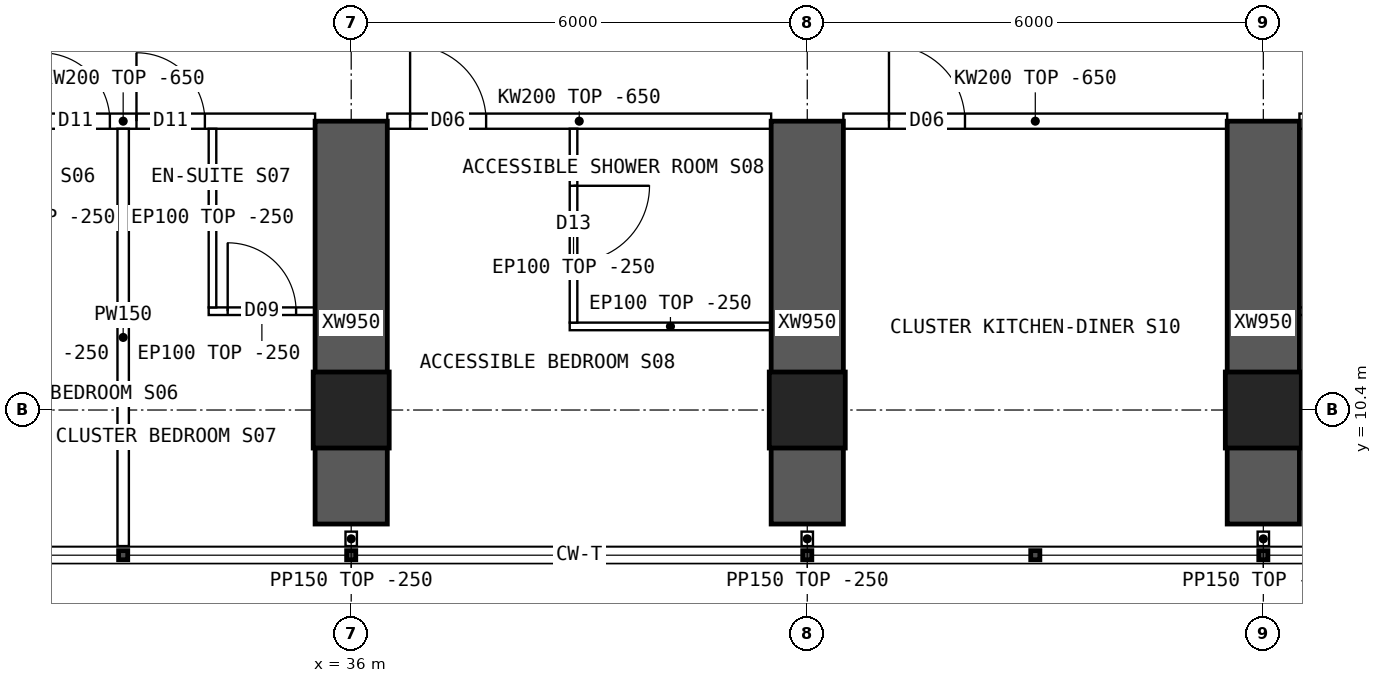
"""IFC4 building model, lengths in metres.
Left out: names, types, materials, properties, quantities, classifications, styles, units other than length and angle.
Written with IfcOpenShell. Run it as: python <this file> out.ifc"""

import sys

from ifc_helpers import new_model, si_unit, direction, frame, frame_2d, origin, origin_2d, place, context, subcontext, project, spatial, polyline, rectangle, hollow_rectangle, outline, extrude, element, fill, save


model = new_model("IFC4")
c1 = context("Model", 3, precision=1e-05, world=origin(), true_north=direction((0.0, 1.0)))
c2 = subcontext(c1, "Body", "Model", "MODEL_VIEW")
j1 = project(units=[si_unit("LENGTHUNIT", "METRE"), si_unit("PLANEANGLEUNIT", "RADIAN")], contexts=[c1])
p1 = place(None, origin())
s1 = spatial("IfcSite", under=j1, at=p1, CompositionType="ELEMENT")
p2 = place(p1, origin())
s2 = spatial("IfcBuilding", under=s1, at=p2, CompositionType="ELEMENT")
p3 = place(p2, frame((0.0, 0.0, 88.15)))
s3 = spatial("IfcBuildingStorey", under=s2, at=p3, CompositionType="ELEMENT", Elevation=88.15)
for number, where, z_axis, x_axis in (
    (1, (36.0, 10.4, 0.0), (0.0, 0.0, 1.0), (1.0, 0.0, 0.0)),
    (2, (42.0, 10.4, 0.0), (0.0, 0.0, 1.0), (1.0, 0.0, 0.0)),
    (3, (48.0, 10.4, 0.0), (0.0, 0.0, 1.0), (1.0, 0.0, 0.0)),
):
    element("IfcColumn", number, at=place(p3, frame(where, z_axis=z_axis, x_axis=x_axis)), inside=s3, PredefinedType="COLUMN", context=c2, shape_type="SweptSolid", body=[
        extrude(hollow_rectangle(XDim=1.0, YDim=1.0, WallThickness=0.1, at=origin_2d()), origin(), (0.0, 0.0, 1.0), 3.75),
    ])
for number, where, z_axis, x_axis in (
    (4, (36.0, 8.9, 0.0), (0.0, 0.0, 1.0), (0.0, 1.0, 0.0)),
    (5, (42.0, 8.9, 0.0), (0.0, 0.0, 1.0), (0.0, 1.0, 0.0)),
    (6, (48.0, 8.9, 0.0), (0.0, 0.0, 1.0), (0.0, 1.0, 0.0)),
):
    element("IfcWall", number, at=place(p3, frame(where, z_axis=z_axis, x_axis=x_axis)), inside=s3, PredefinedType="SHEAR", context=c2, shape_type="SweptSolid", body=[
        extrude(rectangle(XDim=5.3, YDim=0.95, at=frame_2d((2.65, 0.0))), origin(), (0.0, 0.0, 1.0), 3.75),
    ])
p4 = place(p3, frame((30.475, 14.2, 0.0), z_axis=(0.0, 0.0, 1.0), x_axis=(1.0, 0.0, 0.0)))
e7 = element("IfcWall", 7, at=p4, inside=s3, PredefinedType="SOLIDWALL", context=c2, shape_type="SweptSolid", body=[
    extrude(outline(polyline([(0.0, 0.0), (5.05, 0.0), (5.05, 3.1), (0.0, 3.1), (0.0, 0.0)])), frame((0.0, 0.1, 0.0), z_axis=(0.0, -1.0, 0.0), x_axis=(1.0, 0.0, 0.0)), (0.0, 0.0, 1.0), 0.2),
])
p5 = place(p4, frame((1.45, 0.0, 0.0)))
e8 = element("IfcOpeningElement", 8, at=p5, cuts=e7, PredefinedType="OPENING", context=c2, shape_type="SweptSolid", body=[
    extrude(rectangle(XDim=0.9, YDim=2.1, at=frame_2d((0.45, 1.05))), frame((0.0, 0.11, 0.0), z_axis=(0.0, -1.0, 0.0), x_axis=(1.0, 0.0, 0.0)), (0.0, 0.0, 1.0), 0.22),
])
p6 = place(p4, frame((2.7, 0.0, 0.0)))
e9 = element("IfcOpeningElement", 9, at=p6, cuts=e7, PredefinedType="OPENING", context=c2, shape_type="SweptSolid", body=[
    extrude(rectangle(XDim=0.9, YDim=2.1, at=frame_2d((0.45, 1.05))), frame((0.0, 0.11, 0.0), z_axis=(0.0, -1.0, 0.0), x_axis=(1.0, 0.0, 0.0)), (0.0, 0.0, 1.0), 0.22),
])
p7 = place(p3, frame((36.475, 14.2, 0.0), z_axis=(0.0, 0.0, 1.0), x_axis=(1.0, 0.0, 0.0)))
e10 = element("IfcWall", 10, at=p7, inside=s3, PredefinedType="SOLIDWALL", context=c2, shape_type="SweptSolid", body=[
    extrude(outline(polyline([(0.0, 0.0), (5.05, 0.0), (5.05, 3.1), (0.0, 3.1), (0.0, 0.0)])), frame((0.0, 0.1, 0.0), z_axis=(0.0, -1.0, 0.0), x_axis=(1.0, 0.0, 0.0)), (0.0, 0.0, 1.0), 0.2),
])
p8 = place(p7, frame((0.3, 0.0, 0.0)))
e11 = element("IfcOpeningElement", 11, at=p8, cuts=e10, PredefinedType="OPENING", context=c2, shape_type="SweptSolid", body=[
    extrude(rectangle(XDim=1.0, YDim=2.1, at=frame_2d((0.5, 1.05))), frame((0.0, 0.11, 0.0), z_axis=(0.0, -1.0, 0.0), x_axis=(1.0, 0.0, 0.0)), (0.0, 0.0, 1.0), 0.22),
])
p9 = place(p3, frame((42.475, 14.2, 0.0), z_axis=(0.0, 0.0, 1.0), x_axis=(1.0, 0.0, 0.0)))
e12 = element("IfcWall", 12, at=p9, inside=s3, PredefinedType="SOLIDWALL", context=c2, shape_type="SweptSolid", body=[
    extrude(outline(polyline([(0.0, 0.0), (5.05, 0.0), (5.05, 3.1), (0.0, 3.1), (0.0, 0.0)])), frame((0.0, 0.1, 0.0), z_axis=(0.0, -1.0, 0.0), x_axis=(1.0, 0.0, 0.0)), (0.0, 0.0, 1.0), 0.2),
])
p10 = place(p9, frame((0.6, 0.0, 0.0)))
e13 = element("IfcOpeningElement", 13, at=p10, cuts=e12, PredefinedType="OPENING", context=c2, shape_type="SweptSolid", body=[
    extrude(rectangle(XDim=1.0, YDim=2.1, at=frame_2d((0.5, 1.05))), frame((0.0, 0.11, 0.0), z_axis=(0.0, -1.0, 0.0), x_axis=(1.0, 0.0, 0.0)), (0.0, 0.0, 1.0), 0.22),
])
p11 = place(p3, frame((48.475, 14.2, 0.0), z_axis=(0.0, 0.0, 1.0), x_axis=(1.0, 0.0, 0.0)))
e14 = element("IfcWall", 14, at=p11, inside=s3, PredefinedType="SOLIDWALL", context=c2, shape_type="SweptSolid", body=[
    extrude(outline(polyline([(0.0, 0.0), (5.05, 0.0), (5.05, 3.1), (0.0, 3.1), (0.0, 0.0)])), frame((0.0, 0.1, 0.0), z_axis=(0.0, -1.0, 0.0), x_axis=(1.0, 0.0, 0.0)), (0.0, 0.0, 1.0), 0.2),
])
p12 = place(p11, frame((1.45, 0.0, 0.0)))
e15 = element("IfcOpeningElement", 15, at=p12, cuts=e14, PredefinedType="OPENING", context=c2, shape_type="SweptSolid", body=[
    extrude(rectangle(XDim=0.9, YDim=2.1, at=frame_2d((0.45, 1.05))), frame((0.0, 0.11, 0.0), z_axis=(0.0, -1.0, 0.0), x_axis=(1.0, 0.0, 0.0)), (0.0, 0.0, 1.0), 0.22),
])
p13 = place(p11, frame((2.7, 0.0, 0.0)))
e16 = element("IfcOpeningElement", 16, at=p13, cuts=e14, PredefinedType="OPENING", context=c2, shape_type="SweptSolid", body=[
    extrude(rectangle(XDim=0.9, YDim=2.1, at=frame_2d((0.45, 1.05))), frame((0.0, 0.11, 0.0), z_axis=(0.0, -1.0, 0.0), x_axis=(1.0, 0.0, 0.0)), (0.0, 0.0, 1.0), 0.22),
])
p14 = place(p3, frame((33.0, 8.61, 0.0), z_axis=(0.0, 0.0, 1.0), x_axis=(0.0, 1.0, 0.0)))
e17 = element("IfcWall", 17, at=p14, inside=s3, PredefinedType="PARTITIONING", context=c2, shape_type="SweptSolid", body=[
    extrude(outline(polyline([(0.0, 0.0), (5.49, 0.0), (5.49, 3.1), (5.442, 3.1), (5.44, 3.5), (1.992, 3.5), (1.99, 3.1), (1.592, 3.1), (1.59, 3.5), (0.0, 3.5), (0.0, 0.0)])), frame((0.0, 0.075, 0.0), z_axis=(0.0, -1.0, 0.0), x_axis=(1.0, 0.0, 0.0)), (0.0, 0.0, 1.0), 0.15),
])
p15 = place(p3, frame((35.525, 11.7, 0.0), z_axis=(0.0, 0.0, 1.0), x_axis=(-1.0, 0.0, 0.0)))
e18 = element("IfcWall", 18, at=p15, inside=s3, PredefinedType="PARTITIONING", context=c2, shape_type="SweptSolid", body=[
    extrude(rectangle(XDim=1.4, YDim=0.1, at=frame_2d((0.7, 0.0))), origin(), (0.0, 0.0, 1.0), 3.5),
])
p16 = place(p15, frame((0.25, 0.0, 0.0)))
e19 = element("IfcOpeningElement", 19, at=p16, cuts=e18, PredefinedType="OPENING", context=c2, shape_type="SweptSolid", body=[
    extrude(rectangle(XDim=0.9, YDim=2.1, at=frame_2d((0.45, 1.05))), frame((0.0, 0.06, 0.0), z_axis=(0.0, -1.0, 0.0), x_axis=(1.0, 0.0, 0.0)), (0.0, 0.0, 1.0), 0.12),
])
p17 = place(p3, frame((34.175, 11.75, 0.0), z_axis=(0.0, 0.0, 1.0), x_axis=(0.0, 1.0, 0.0)))
e20 = element("IfcWall", 20, at=p17, inside=s3, PredefinedType="PARTITIONING", context=c2, shape_type="SweptSolid", body=[
    extrude(outline(polyline([(0.0, 0.0), (2.35, 0.0), (2.35, 3.1), (2.302, 3.1), (2.3, 3.5), (0.0, 3.5), (0.0, 0.0)])), frame((0.0, 0.05, 0.0), z_axis=(0.0, -1.0, 0.0), x_axis=(1.0, 0.0, 0.0)), (0.0, 0.0, 1.0), 0.1),
])
p18 = place(p3, frame((38.875, 11.5, 0.0), z_axis=(0.0, 0.0, 1.0), x_axis=(1.0, 0.0, 0.0)))
e21 = element("IfcWall", 21, at=p18, inside=s3, PredefinedType="PARTITIONING", context=c2, shape_type="SweptSolid", body=[
    extrude(rectangle(XDim=2.65, YDim=0.1, at=frame_2d((1.325, 0.0))), origin(), (0.0, 0.0, 1.0), 3.5),
])
p19 = place(p3, frame((38.925, 11.55, 0.0), z_axis=(0.0, 0.0, 1.0), x_axis=(0.0, 1.0, 0.0)))
e22 = element("IfcWall", 22, at=p19, inside=s3, PredefinedType="PARTITIONING", context=c2, shape_type="SweptSolid", body=[
    extrude(outline(polyline([(0.0, 0.0), (2.55, 0.0), (2.55, 3.1), (2.502, 3.1), (2.5, 3.5), (0.0, 3.5), (0.0, 0.0)])), frame((0.0, 0.05, 0.0), z_axis=(0.0, -1.0, 0.0), x_axis=(1.0, 0.0, 0.0)), (0.0, 0.0, 1.0), 0.1),
])
p20 = place(p19, frame((0.8, 0.0, 0.0)))
e23 = element("IfcOpeningElement", 23, at=p20, cuts=e22, PredefinedType="OPENING", context=c2, shape_type="SweptSolid", body=[
    extrude(rectangle(XDim=1.0, YDim=2.1, at=frame_2d((0.5, 1.05))), frame((0.0, 0.06, 0.0), z_axis=(0.0, -1.0, 0.0), x_axis=(1.0, 0.0, 0.0)), (0.0, 0.0, 1.0), 0.12),
])
p21 = place(p3, frame((49.875, 11.7, 0.0), z_axis=(0.0, 0.0, 1.0), x_axis=(-1.0, 0.0, 0.0)))
e24 = element("IfcWall", 24, at=p21, inside=s3, PredefinedType="PARTITIONING", context=c2, shape_type="SweptSolid", body=[
    extrude(rectangle(XDim=1.4, YDim=0.1, at=frame_2d((0.7, 0.0))), origin(), (0.0, 0.0, 1.0), 3.5),
])
p22 = place(p21, frame((0.25, 0.0, 0.0)))
e25 = element("IfcOpeningElement", 25, at=p22, cuts=e24, PredefinedType="OPENING", context=c2, shape_type="SweptSolid", body=[
    extrude(rectangle(XDim=0.9, YDim=2.1, at=frame_2d((0.45, 1.05))), frame((0.0, 0.06, 0.0), z_axis=(0.0, -1.0, 0.0), x_axis=(1.0, 0.0, 0.0)), (0.0, 0.0, 1.0), 0.12),
])
for number, where, z_axis, x_axis in (
    (26, (36.0, 8.8, 0.0), (0.0, 0.0, 1.0), (0.0, -1.0, 0.0)),
    (27, (42.0, 8.8, 0.0), (0.0, 0.0, 1.0), (0.0, -1.0, 0.0)),
    (28, (48.0, 8.8, 0.0), (0.0, 0.0, 1.0), (0.0, -1.0, 0.0)),
):
    element("IfcWall", number, at=place(p3, frame(where, z_axis=z_axis, x_axis=x_axis)), inside=s3, PredefinedType="PARTITIONING", context=c2, shape_type="SweptSolid", body=[
        extrude(rectangle(XDim=0.19, YDim=0.15, at=frame_2d((0.095, 0.0))), origin(), (0.0, 0.0, 1.0), 3.5),
    ])
p23 = place(p5, origin())
e29 = element("IfcDoor", 29, at=p23, inside=s3, OperationType="SINGLE_SWING_LEFT", PredefinedType="DOOR", context=c2, shape_type="SweptSolid", body=[
    extrude(rectangle(XDim=0.9, YDim=2.1, at=frame_2d((0.45, 1.05))), frame((0.0, 0.025, 0.0), z_axis=(0.0, -1.0, 0.0), x_axis=(1.0, 0.0, 0.0)), (0.0, 0.0, 1.0), 0.05),
])
fill(e8, e29)
p24 = place(p16, origin())
e30 = element("IfcDoor", 30, at=p24, inside=s3, OperationType="SINGLE_SWING_RIGHT", PredefinedType="DOOR", context=c2, shape_type="SweptSolid", body=[
    extrude(rectangle(XDim=0.9, YDim=2.1, at=frame_2d((0.45, 1.05))), frame((0.0, 0.025, 0.0), z_axis=(0.0, -1.0, 0.0), x_axis=(1.0, 0.0, 0.0)), (0.0, 0.0, 1.0), 0.05),
])
fill(e19, e30)
p25 = place(p6, origin())
e31 = element("IfcDoor", 31, at=p25, inside=s3, OperationType="SINGLE_SWING_LEFT", PredefinedType="DOOR", context=c2, shape_type="SweptSolid", body=[
    extrude(rectangle(XDim=0.9, YDim=2.1, at=frame_2d((0.45, 1.05))), frame((0.0, 0.025, 0.0), z_axis=(0.0, -1.0, 0.0), x_axis=(1.0, 0.0, 0.0)), (0.0, 0.0, 1.0), 0.05),
])
fill(e9, e31)
p26 = place(p20, origin())
e32 = element("IfcDoor", 32, at=p26, inside=s3, OperationType="SINGLE_SWING_RIGHT", PredefinedType="DOOR", context=c2, shape_type="SweptSolid", body=[
    extrude(rectangle(XDim=1.0, YDim=2.1, at=frame_2d((0.5, 1.05))), frame((0.0, 0.025, 0.0), z_axis=(0.0, -1.0, 0.0), x_axis=(1.0, 0.0, 0.0)), (0.0, 0.0, 1.0), 0.05),
])
fill(e23, e32)
p27 = place(p8, origin())
e33 = element("IfcDoor", 33, at=p27, inside=s3, OperationType="SINGLE_SWING_LEFT", PredefinedType="DOOR", context=c2, shape_type="SweptSolid", body=[
    extrude(rectangle(XDim=1.0, YDim=2.1, at=frame_2d((0.5, 1.05))), frame((0.0, 0.025, 0.0), z_axis=(0.0, -1.0, 0.0), x_axis=(1.0, 0.0, 0.0)), (0.0, 0.0, 1.0), 0.05),
])
fill(e11, e33)
p28 = place(p10, origin())
e34 = element("IfcDoor", 34, at=p28, inside=s3, OperationType="SINGLE_SWING_LEFT", PredefinedType="DOOR", context=c2, shape_type="SweptSolid", body=[
    extrude(rectangle(XDim=1.0, YDim=2.1, at=frame_2d((0.5, 1.05))), frame((0.0, 0.025, 0.0), z_axis=(0.0, -1.0, 0.0), x_axis=(1.0, 0.0, 0.0)), (0.0, 0.0, 1.0), 0.05),
])
fill(e13, e34)
save(model, sys.argv[1])
